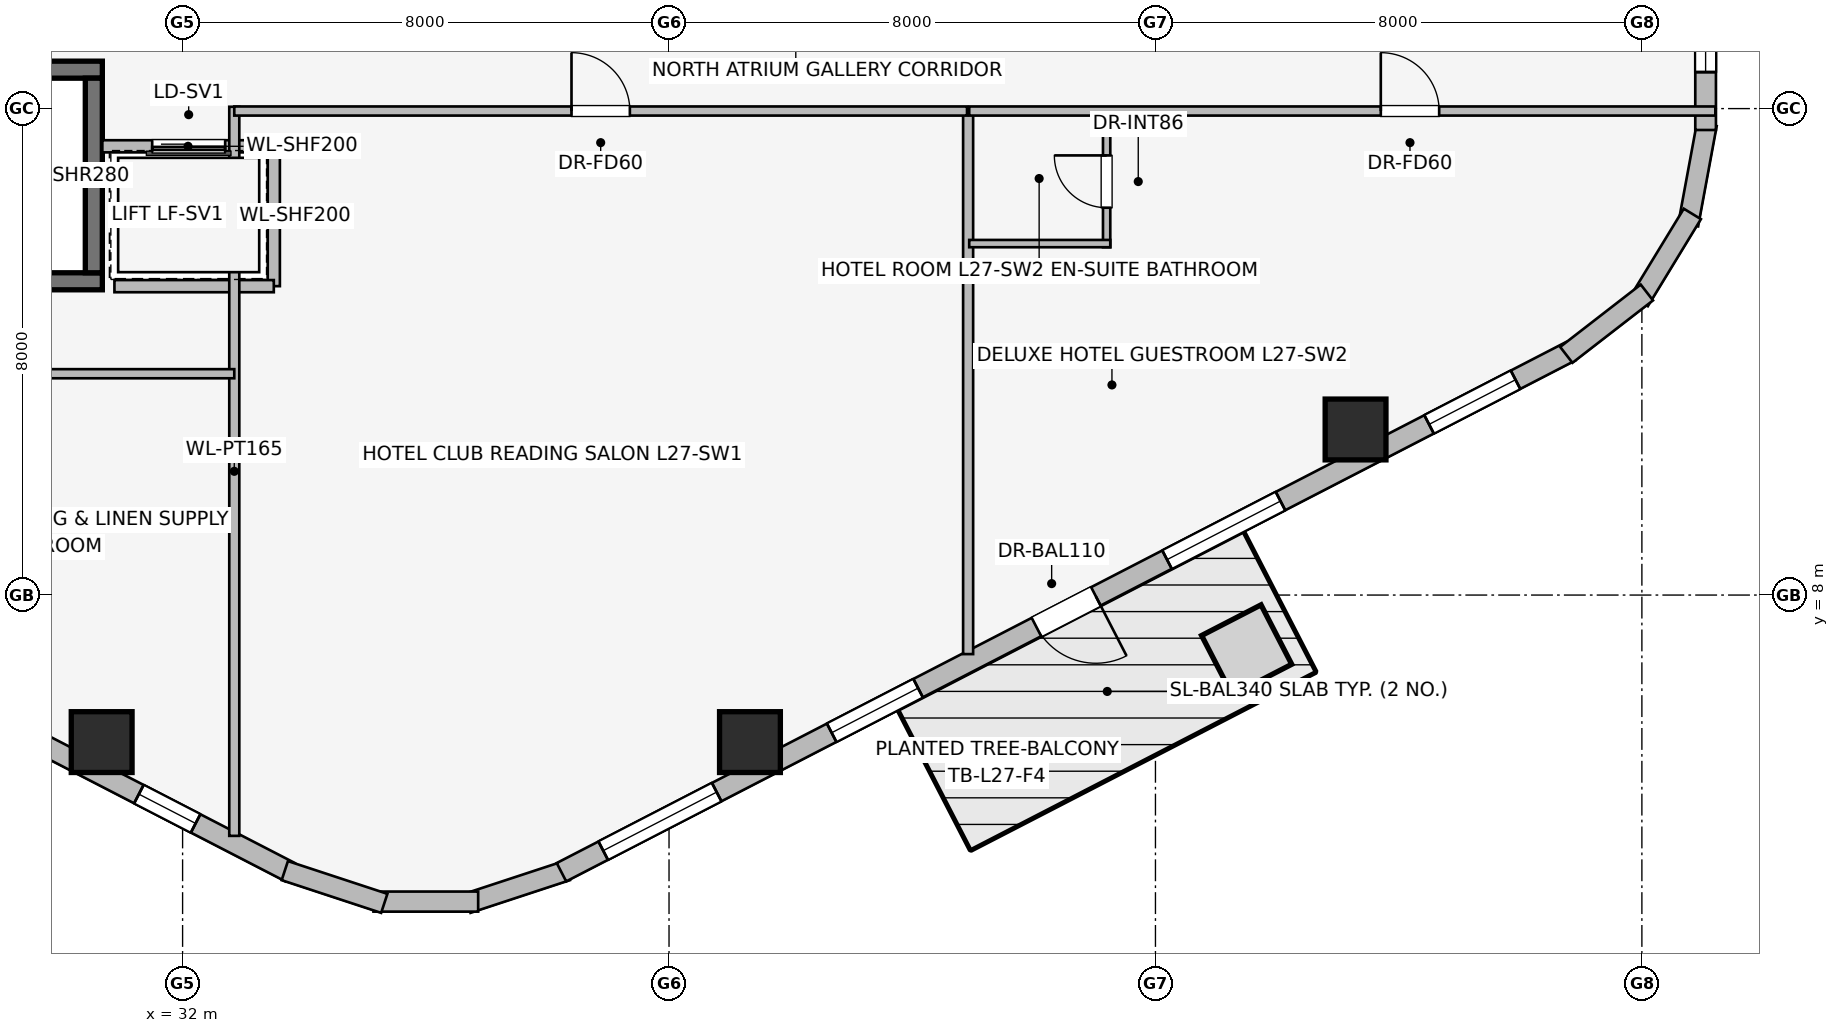
"""IFC4 building model, lengths in metres.
Left out: names, types, materials, properties, quantities, classifications, styles, units other than length and angle.
Written with IfcOpenShell. Run it as: python <this file> out.ifc"""

import sys

from ifc_helpers import new_model, si_unit, direction, frame, frame_2d, origin, origin_2d, place, context, subcontext, project, spatial, rectangle, extrude, element, fill, save


model = new_model("IFC4")
c1 = context("Model", 3, precision=1e-05, world=origin(), true_north=direction((0.0, 1.0)))
c2 = subcontext(c1, "Body", "Model", "MODEL_VIEW")
j1 = project(units=[si_unit("LENGTHUNIT", "METRE"), si_unit("PLANEANGLEUNIT", "RADIAN")], contexts=[c1])
p1 = place(None, origin())
s1 = spatial("IfcSite", under=j1, at=p1, CompositionType="ELEMENT")
p2 = place(p1, origin())
s2 = spatial("IfcBuilding", under=s1, at=p2, CompositionType="ELEMENT")
p3 = place(p2, frame((0.0, 0.0, 105.0)))
s3 = spatial("IfcBuildingStorey", under=s2, at=p3, CompositionType="ELEMENT", Elevation=105.0)
p4 = place(p3, frame((22.32, 13.16, 0.0), z_axis=(0.0, 0.0, 1.0), x_axis=(1.0, 0.0, 0.0)))
e1 = element("IfcWall", 1, at=p4, inside=s3, PredefinedType="SHEAR", context=c2, shape_type="SweptSolid", body=[
    extrude(rectangle(XDim=8.36, YDim=0.28, at=frame_2d((4.18, 0.0))), origin(), (0.0, 0.0, 1.0), 3.45),
])
p5 = place(p3, frame((30.68, 16.64, 0.0), z_axis=(0.0, 0.0, 1.0), x_axis=(-1.0, 0.0, 0.0)))
e2 = element("IfcWall", 2, at=p5, inside=s3, PredefinedType="SHEAR", context=c2, shape_type="SweptSolid", body=[
    extrude(rectangle(XDim=8.36, YDim=0.28, at=frame_2d((4.18, 0.0))), origin(), (0.0, 0.0, 1.0), 3.45),
])
p6 = place(p5, frame((6.08, 0.0, 0.0)))
e3 = element("IfcOpeningElement", 3, at=p6, cuts=e2, PredefinedType="OPENING", context=c2, shape_type="SweptSolid", body=[
    extrude(rectangle(XDim=1.05, YDim=2.0, at=frame_2d((0.525, 1.0))), frame((0.0, 0.15, 0.0), z_axis=(0.0, -1.0, 0.0), x_axis=(1.0, 0.0, 0.0)), (0.0, 0.0, 1.0), 0.3),
])
p7 = place(p3, frame((30.54, 13.3, 0.0), z_axis=(0.0, 0.0, 1.0), x_axis=(0.0, 1.0, 0.0)))
e4 = element("IfcWall", 4, at=p7, inside=s3, PredefinedType="SHEAR", context=c2, shape_type="SweptSolid", body=[
    extrude(rectangle(XDim=3.2, YDim=0.28, at=frame_2d((1.6, 0.0))), origin(), (0.0, 0.0, 1.0), 3.45),
])
for number, where, z_axis, x_axis in (
    (5, (30.669, 5.582, 0.0), (0.0, 0.0, 1.0), (1.0, 0.0, 0.0)),
    (6, (41.331, 5.582, 0.0), (0.0, 0.0, 1.0), (1.0, 0.0, 0.0)),
    (7, (51.291, 10.723, 0.0), (0.0, 0.0, 1.0), (1.0, 0.0, 0.0)),
):
    element("IfcColumn", number, at=place(p3, frame(where, z_axis=z_axis, x_axis=x_axis)), inside=s3, PredefinedType="COLUMN", context=c2, shape_type="SweptSolid", body=[
        extrude(rectangle(XDim=1.0, YDim=1.0, at=origin_2d()), origin(), (0.0, 0.0, 1.0), 3.45),
    ])
p8 = place(p3, frame((33.769, 3.442, 0.0), z_axis=(0.0, 0.0, 1.0), x_axis=(-0.888613612362, 0.458656568606, 0.0)))
e8 = element("IfcWall", 8, at=p8, inside=s3, PredefinedType="STANDARD", context=c2, shape_type="SweptSolid", body=[
    extrude(rectangle(XDim=18.681, YDim=0.34, at=frame_2d((9.34, 0.0))), origin(), (0.0, 0.0, 1.0), 3.19),
])
p9 = place(p8, frame((1.75, 0.0, 0.75)))
e9 = element("IfcOpeningElement", 9, at=p9, cuts=e8, PredefinedType="OPENING", context=c2, shape_type="SweptSolid", body=[
    extrude(rectangle(XDim=1.05, YDim=1.4, at=frame_2d((0.525, 0.7))), frame((0.0, 0.18, 0.0), z_axis=(0.0, -1.0, 0.0), x_axis=(1.0, 0.0, 0.0)), (0.0, 0.0, 1.0), 0.36),
])
p10 = place(p8, frame((4.765, 0.0, 0.75)))
e10 = element("IfcOpeningElement", 10, at=p10, cuts=e8, PredefinedType="OPENING", context=c2, shape_type="SweptSolid", body=[
    extrude(rectangle(XDim=2.1, YDim=1.5, at=frame_2d((1.05, 0.75))), frame((0.0, 0.18, 0.0), z_axis=(0.0, -1.0, 0.0), x_axis=(1.0, 0.0, 0.0)), (0.0, 0.0, 1.0), 0.36),
])
p11 = place(p8, frame((7.644, 0.0, 0.75)))
e11 = element("IfcOpeningElement", 11, at=p11, cuts=e8, PredefinedType="OPENING", context=c2, shape_type="SweptSolid", body=[
    extrude(rectangle(XDim=2.1, YDim=1.5, at=frame_2d((1.05, 0.75))), frame((0.0, 0.18, 0.0), z_axis=(0.0, -1.0, 0.0), x_axis=(1.0, 0.0, 0.0)), (0.0, 0.0, 1.0), 0.36),
])
p12 = place(p8, frame((11.774, 0.0, 0.75)))
e12 = element("IfcOpeningElement", 12, at=p12, cuts=e8, PredefinedType="OPENING", context=c2, shape_type="SweptSolid", body=[
    extrude(rectangle(XDim=1.6, YDim=1.55, at=frame_2d((0.8, 0.775))), frame((0.0, 0.18, 0.0), z_axis=(0.0, -1.0, 0.0), x_axis=(1.0, 0.0, 0.0)), (0.0, 0.0, 1.0), 0.36),
])
p13 = place(p8, frame((15.92, 0.0, 0.75)))
e13 = element("IfcOpeningElement", 13, at=p13, cuts=e8, PredefinedType="OPENING", context=c2, shape_type="SweptSolid", body=[
    extrude(rectangle(XDim=1.05, YDim=1.4, at=frame_2d((0.525, 0.7))), frame((0.0, 0.18, 0.0), z_axis=(0.0, -1.0, 0.0), x_axis=(1.0, 0.0, 0.0)), (0.0, 0.0, 1.0), 0.36),
])
for number, where, z_axis, x_axis in (
    (14, (38.319, 3.468, 0.0), (0.0, 0.0, 1.0), (-0.95, -0.312, 0.0)),
    (15, (36.861, 2.959, 0.0), (0.0, 0.0, 1.0), (-1.0, 0.0, 0.0)),
    (16, (35.317, 2.93, 0.0), (0.0, 0.0, 1.0), (-0.95, 0.312, 0.0)),
):
    element("IfcWall", number, at=place(p3, frame(where, z_axis=z_axis, x_axis=x_axis)), inside=s3, PredefinedType="STANDARD", context=c2, shape_type="SweptSolid", body=[
        extrude(rectangle(XDim=1.722, YDim=0.33, at=frame_2d((0.861, 0.0))), origin(), (0.0, 0.0, 1.0), 3.19),
    ])
p14 = place(p3, frame((54.831, 12.01, 0.0), z_axis=(0.0, 0.0, 1.0), x_axis=(-0.888613612362, -0.458656568606, 0.0)))
e17 = element("IfcWall", 17, at=p14, inside=s3, PredefinedType="STANDARD", context=c2, shape_type="SweptSolid", body=[
    extrude(rectangle(XDim=18.681, YDim=0.34, at=frame_2d((9.34, 0.0))), origin(), (0.0, 0.0, 1.0), 3.19),
])
p15 = place(p14, frame((8.79, 0.0, 0.0)))
e18 = element("IfcOpeningElement", 18, at=p15, cuts=e17, PredefinedType="OPENING", context=c2, shape_type="SweptSolid", body=[
    extrude(rectangle(XDim=1.1, YDim=2.04, at=frame_2d((0.55, 1.02))), frame((0.0, 0.18, 0.0), z_axis=(0.0, -1.0, 0.0), x_axis=(1.0, 0.0, 0.0)), (0.0, 0.0, 1.0), 0.36),
])
p16 = place(p14, frame((1.023, 0.0, 0.75)))
e19 = element("IfcOpeningElement", 19, at=p16, cuts=e17, PredefinedType="OPENING", context=c2, shape_type="SweptSolid", body=[
    extrude(rectangle(XDim=1.6, YDim=1.55, at=frame_2d((0.8, 0.775))), frame((0.0, 0.18, 0.0), z_axis=(0.0, -1.0, 0.0), x_axis=(1.0, 0.0, 0.0)), (0.0, 0.0, 1.0), 0.36),
])
p17 = place(p14, frame((5.373, 0.0, 0.75)))
e20 = element("IfcOpeningElement", 20, at=p17, cuts=e17, PredefinedType="OPENING", context=c2, shape_type="SweptSolid", body=[
    extrude(rectangle(XDim=2.1, YDim=1.5, at=frame_2d((1.05, 0.75))), frame((0.0, 0.18, 0.0), z_axis=(0.0, -1.0, 0.0), x_axis=(1.0, 0.0, 0.0)), (0.0, 0.0, 1.0), 0.36),
])
p18 = place(p14, frame((12.08, 0.0, 0.75)))
e21 = element("IfcOpeningElement", 21, at=p18, cuts=e17, PredefinedType="OPENING", context=c2, shape_type="SweptSolid", body=[
    extrude(rectangle(XDim=1.6, YDim=1.55, at=frame_2d((0.8, 0.775))), frame((0.0, 0.18, 0.0), z_axis=(0.0, -1.0, 0.0), x_axis=(1.0, 0.0, 0.0)), (0.0, 0.0, 1.0), 0.36),
])
p19 = place(p14, frame((15.808, 0.0, 0.75)))
e22 = element("IfcOpeningElement", 22, at=p19, cuts=e17, PredefinedType="OPENING", context=c2, shape_type="SweptSolid", body=[
    extrude(rectangle(XDim=2.1, YDim=1.5, at=frame_2d((1.05, 0.75))), frame((0.0, 0.18, 0.0), z_axis=(0.0, -1.0, 0.0), x_axis=(1.0, 0.0, 0.0)), (0.0, 0.0, 1.0), 0.36),
])
p20 = place(p3, frame((57.068, 15.742, 0.0), z_axis=(0.0, 0.0, 1.0), x_axis=(-0.181984991895, -0.983301308209, 0.0)))
e23 = element("IfcWall", 23, at=p20, inside=s3, PredefinedType="STANDARD", context=c2, shape_type="SweptSolid", body=[
    extrude(rectangle(XDim=1.677, YDim=0.33, at=frame_2d((0.838, 0.0))), origin(), (0.0, 0.0, 1.0), 3.19),
])
p21 = place(p3, frame((56.83, 14.268, 0.0), z_axis=(0.0, 0.0, 1.0), x_axis=(-0.520519429557, -0.853849824883, 0.0)))
e24 = element("IfcWall", 24, at=p21, inside=s3, PredefinedType="STANDARD", context=c2, shape_type="SweptSolid", body=[
    extrude(rectangle(XDim=1.677, YDim=0.33, at=frame_2d((0.839, 0.0))), origin(), (0.0, 0.0, 1.0), 3.19),
])
p22 = place(p3, frame((56.082, 12.976, 0.0), z_axis=(0.0, 0.0, 1.0), x_axis=(-0.790621329885, -0.612305408053, 0.0)))
e25 = element("IfcWall", 25, at=p22, inside=s3, PredefinedType="STANDARD", context=c2, shape_type="SweptSolid", body=[
    extrude(rectangle(XDim=1.676, YDim=0.33, at=frame_2d((0.838, 0.0))), origin(), (0.0, 0.0, 1.0), 3.19),
])
p23 = place(p3, frame((57.048, 20.325, 0.0), z_axis=(0.0, 0.0, 1.0), x_axis=(0.0, -1.0, 0.0)))
e26 = element("IfcWall", 26, at=p23, inside=s3, PredefinedType="STANDARD", context=c2, shape_type="SweptSolid", body=[
    extrude(rectangle(XDim=4.677, YDim=0.34, at=frame_2d((2.338, 0.0))), origin(), (0.0, 0.0, 1.0), 3.19),
])
p24 = place(p23, frame((2.675, 0.0, 0.75)))
e27 = element("IfcOpeningElement", 27, at=p24, cuts=e26, PredefinedType="OPENING", context=c2, shape_type="SweptSolid", body=[
    extrude(rectangle(XDim=1.05, YDim=1.4, at=frame_2d((0.525, 0.7))), frame((0.0, 0.18, 0.0), z_axis=(0.0, -1.0, 0.0), x_axis=(1.0, 0.0, 0.0)), (0.0, 0.0, 1.0), 0.36),
])
p25 = place(p3, frame((33.5, 15.38, 0.0), z_axis=(0.0, 0.0, 1.0), x_axis=(-1.0, 0.0, 0.0)))
e28 = element("IfcWall", 28, at=p25, inside=s3, PredefinedType="PARTITIONING", context=c2, shape_type="SweptSolid", body=[
    extrude(rectangle(XDim=2.82, YDim=0.2, at=frame_2d((1.41, 0.0))), origin(), (0.0, 0.0, 1.0), 3.19),
])
p26 = place(p25, frame((0.8, 0.0, 0.0)))
e29 = element("IfcOpeningElement", 29, at=p26, cuts=e28, PredefinedType="OPENING", context=c2, shape_type="SweptSolid", body=[
    extrude(rectangle(XDim=1.2, YDim=2.2, at=frame_2d((0.6, 1.1))), frame((0.0, 0.11, 0.0), z_axis=(0.0, -1.0, 0.0), x_axis=(1.0, 0.0, 0.0)), (0.0, 0.0, 1.0), 0.22),
])
p27 = place(p3, frame((33.5, 13.08, 0.0), z_axis=(0.0, 0.0, 1.0), x_axis=(0.0, 1.0, 0.0)))
e30 = element("IfcWall", 30, at=p27, inside=s3, PredefinedType="PARTITIONING", context=c2, shape_type="SweptSolid", body=[
    extrude(rectangle(XDim=2.3, YDim=0.2, at=frame_2d((1.15, 0.0))), origin(), (0.0, 0.0, 1.0), 3.19),
])
p28 = place(p3, frame((30.879, 13.08, 0.0), z_axis=(0.0, 0.0, 1.0), x_axis=(1.0, 0.0, 0.0)))
e31 = element("IfcWall", 31, at=p28, inside=s3, PredefinedType="PARTITIONING", context=c2, shape_type="SweptSolid", body=[
    extrude(rectangle(XDim=2.621, YDim=0.2, at=frame_2d((1.311, 0.0))), origin(), (0.0, 0.0, 1.0), 3.19),
])
p29 = place(p3, frame((32.85, 4.04, 0.0), z_axis=(0.0, 0.0, 1.0), x_axis=(0.0, 1.0, 0.0)))
e32 = element("IfcWall", 32, at=p29, inside=s3, PredefinedType="PARTITIONING", context=c2, shape_type="SweptSolid", body=[
    extrude(rectangle(XDim=11.99, YDim=0.165, at=frame_2d((5.995, 0.0))), origin(), (0.0, 0.0, 1.0), 3.19),
])
p30 = place(p3, frame((18.126, 11.64, 0.0), z_axis=(0.0, 0.0, 1.0), x_axis=(1.0, 0.0, 0.0)))
e33 = element("IfcWall", 33, at=p30, inside=s3, PredefinedType="PARTITIONING", context=c2, shape_type="SweptSolid", body=[
    extrude(rectangle(XDim=14.724, YDim=0.15, at=frame_2d((7.362, 0.0))), origin(), (0.0, 0.0, 1.0), 3.19),
])
p31 = place(p30, frame((4.274, 0.0, 0.0)))
e34 = element("IfcOpeningElement", 34, at=p31, cuts=e33, PredefinedType="OPENING", context=c2, shape_type="SweptSolid", body=[
    extrude(rectangle(XDim=0.9, YDim=2.0, at=frame_2d((0.45, 1.0))), frame((0.0, 0.085, 0.0), z_axis=(0.0, -1.0, 0.0), x_axis=(1.0, 0.0, 0.0)), (0.0, 0.0, 1.0), 0.17),
])
p32 = place(p30, frame((7.724, 0.0, 0.0)))
e35 = element("IfcOpeningElement", 35, at=p32, cuts=e33, PredefinedType="OPENING", context=c2, shape_type="SweptSolid", body=[
    extrude(rectangle(XDim=0.9, YDim=2.0, at=frame_2d((0.45, 1.0))), frame((0.0, 0.085, 0.0), z_axis=(0.0, -1.0, 0.0), x_axis=(1.0, 0.0, 0.0)), (0.0, 0.0, 1.0), 0.17),
])
p33 = place(p3, frame((44.919, 7.029, 0.0), z_axis=(0.0, 0.0, 1.0), x_axis=(0.0, 1.0, 0.0)))
e36 = element("IfcWall", 36, at=p33, inside=s3, PredefinedType="PARTITIONING", context=c2, shape_type="SweptSolid", body=[
    extrude(rectangle(XDim=8.901, YDim=0.165, at=frame_2d((4.45, 0.0))), origin(), (0.0, 0.0, 1.0), 3.19),
])
p34 = place(p3, frame((32.85, 15.96, 0.0), z_axis=(0.0, 0.0, 1.0), x_axis=(1.0, 0.0, 0.0)))
e37 = element("IfcWall", 37, at=p34, inside=s3, PredefinedType="PARTITIONING", context=c2, shape_type="SweptSolid", body=[
    extrude(rectangle(XDim=12.051, YDim=0.15, at=frame_2d((6.025, 0.0))), origin(), (0.0, 0.0, 1.0), 3.19),
])
p35 = place(p34, frame((5.546, 0.0, 0.0)))
e38 = element("IfcOpeningElement", 38, at=p35, cuts=e37, PredefinedType="OPENING", context=c2, shape_type="SweptSolid", body=[
    extrude(rectangle(XDim=0.96, YDim=2.0, at=frame_2d((0.48, 1.0))), frame((0.0, 0.085, 0.0), z_axis=(0.0, -1.0, 0.0), x_axis=(1.0, 0.0, 0.0)), (0.0, 0.0, 1.0), 0.17),
])
p36 = place(p3, frame((47.197, 13.72, 0.0), z_axis=(0.0, 0.0, 1.0), x_axis=(0.0, 1.0, 0.0)))
e39 = element("IfcWall", 39, at=p36, inside=s3, PredefinedType="PARTITIONING", context=c2, shape_type="SweptSolid", body=[
    extrude(rectangle(XDim=2.24, YDim=0.12, at=frame_2d((1.12, 0.0))), origin(), (0.0, 0.0, 1.0), 3.19),
])
p37 = place(p36, frame((0.65, 0.0, 0.0)))
e40 = element("IfcOpeningElement", 40, at=p37, cuts=e39, PredefinedType="OPENING", context=c2, shape_type="SweptSolid", body=[
    extrude(rectangle(XDim=0.86, YDim=2.0, at=frame_2d((0.43, 1.0))), frame((0.0, 0.07, 0.0), z_axis=(0.0, -1.0, 0.0), x_axis=(1.0, 0.0, 0.0)), (0.0, 0.0, 1.0), 0.14),
])
p38 = place(p3, frame((44.937, 13.78, 0.0), z_axis=(0.0, 0.0, 1.0), x_axis=(1.0, 0.0, 0.0)))
e41 = element("IfcWall", 41, at=p38, inside=s3, PredefinedType="PARTITIONING", context=c2, shape_type="SweptSolid", body=[
    extrude(rectangle(XDim=2.32, YDim=0.12, at=frame_2d((1.16, 0.0))), origin(), (0.0, 0.0, 1.0), 3.19),
])
p39 = place(p3, frame((44.937, 15.96, 0.0), z_axis=(0.0, 0.0, 1.0), x_axis=(1.0, 0.0, 0.0)))
e42 = element("IfcWall", 42, at=p39, inside=s3, PredefinedType="PARTITIONING", context=c2, shape_type="SweptSolid", body=[
    extrude(rectangle(XDim=12.271, YDim=0.15, at=frame_2d((6.135, 0.0))), origin(), (0.0, 0.0, 1.0), 3.19),
])
p40 = place(p39, frame((6.769, 0.0, 0.0)))
e43 = element("IfcOpeningElement", 43, at=p40, cuts=e42, PredefinedType="OPENING", context=c2, shape_type="SweptSolid", body=[
    extrude(rectangle(XDim=0.96, YDim=2.0, at=frame_2d((0.48, 1.0))), frame((0.0, 0.085, 0.0), z_axis=(0.0, -1.0, 0.0), x_axis=(1.0, 0.0, 0.0)), (0.0, 0.0, 1.0), 0.17),
])
p41 = place(p9, origin())
e44 = element("IfcWindow", 44, at=p41, inside=s3, PartitioningType="SINGLE_PANEL", PredefinedType="WINDOW", context=c2, shape_type="SweptSolid", body=[
    extrude(rectangle(XDim=1.05, YDim=1.4, at=frame_2d((0.525, 0.7))), frame((0.0, 0.03, 0.0), z_axis=(0.0, -1.0, 0.0), x_axis=(1.0, 0.0, 0.0)), (0.0, 0.0, 1.0), 0.06),
])
fill(e9, e44)
p42 = place(p15, origin())
e45 = element("IfcDoor", 45, at=p42, inside=s3, OperationType="SINGLE_SWING_LEFT", PredefinedType="DOOR", context=c2, shape_type="SweptSolid", body=[
    extrude(rectangle(XDim=1.1, YDim=2.04, at=frame_2d((0.55, 1.02))), frame((0.0, 0.025, 0.0), z_axis=(0.0, -1.0, 0.0), x_axis=(1.0, 0.0, 0.0)), (0.0, 0.0, 1.0), 0.05),
])
fill(e18, e45)
p43 = place(p16, origin())
e46 = element("IfcWindow", 46, at=p43, inside=s3, PartitioningType="SINGLE_PANEL", PredefinedType="WINDOW", context=c2, shape_type="SweptSolid", body=[
    extrude(rectangle(XDim=1.6, YDim=1.55, at=frame_2d((0.8, 0.775))), frame((0.0, 0.03, 0.0), z_axis=(0.0, -1.0, 0.0), x_axis=(1.0, 0.0, 0.0)), (0.0, 0.0, 1.0), 0.06),
])
fill(e19, e46)
p44 = place(p17, origin())
e47 = element("IfcWindow", 47, at=p44, inside=s3, PartitioningType="SINGLE_PANEL", PredefinedType="WINDOW", context=c2, shape_type="SweptSolid", body=[
    extrude(rectangle(XDim=2.1, YDim=1.5, at=frame_2d((1.05, 0.75))), frame((0.0, 0.03, 0.0), z_axis=(0.0, -1.0, 0.0), x_axis=(1.0, 0.0, 0.0)), (0.0, 0.0, 1.0), 0.06),
])
fill(e20, e47)
p45 = place(p18, origin())
e48 = element("IfcWindow", 48, at=p45, inside=s3, PartitioningType="SINGLE_PANEL", PredefinedType="WINDOW", context=c2, shape_type="SweptSolid", body=[
    extrude(rectangle(XDim=1.6, YDim=1.55, at=frame_2d((0.8, 0.775))), frame((0.0, 0.03, 0.0), z_axis=(0.0, -1.0, 0.0), x_axis=(1.0, 0.0, 0.0)), (0.0, 0.0, 1.0), 0.06),
])
fill(e21, e48)
p46 = place(p19, origin())
e49 = element("IfcWindow", 49, at=p46, inside=s3, PartitioningType="SINGLE_PANEL", PredefinedType="WINDOW", context=c2, shape_type="SweptSolid", body=[
    extrude(rectangle(XDim=2.1, YDim=1.5, at=frame_2d((1.05, 0.75))), frame((0.0, 0.03, 0.0), z_axis=(0.0, -1.0, 0.0), x_axis=(1.0, 0.0, 0.0)), (0.0, 0.0, 1.0), 0.06),
])
fill(e22, e49)
p47 = place(p24, origin())
e50 = element("IfcWindow", 50, at=p47, inside=s3, PartitioningType="SINGLE_PANEL", PredefinedType="WINDOW", context=c2, shape_type="SweptSolid", body=[
    extrude(rectangle(XDim=1.05, YDim=1.4, at=frame_2d((0.525, 0.7))), frame((0.0, 0.03, 0.0), z_axis=(0.0, -1.0, 0.0), x_axis=(1.0, 0.0, 0.0)), (0.0, 0.0, 1.0), 0.06),
])
fill(e27, e50)
p48 = place(p26, origin())
e51 = element("IfcDoor", 51, at=p48, inside=s3, OperationType="SLIDING_TO_RIGHT", PredefinedType="DOOR", context=c2, shape_type="SweptSolid", body=[
    extrude(rectangle(XDim=1.2, YDim=2.2, at=frame_2d((0.6, 1.1))), frame((0.0, 0.025, 0.0), z_axis=(0.0, -1.0, 0.0), x_axis=(1.0, 0.0, 0.0)), (0.0, 0.0, 1.0), 0.05),
])
fill(e29, e51)
p49 = place(p35, origin())
e52 = element("IfcDoor", 52, at=p49, inside=s3, OperationType="SINGLE_SWING_LEFT", PredefinedType="DOOR", context=c2, shape_type="SweptSolid", body=[
    extrude(rectangle(XDim=0.96, YDim=2.0, at=frame_2d((0.48, 1.0))), frame((0.0, 0.025, 0.0), z_axis=(0.0, -1.0, 0.0), x_axis=(1.0, 0.0, 0.0)), (0.0, 0.0, 1.0), 0.05),
])
fill(e38, e52)
p50 = place(p37, origin())
e53 = element("IfcDoor", 53, at=p50, inside=s3, OperationType="SINGLE_SWING_RIGHT", PredefinedType="DOOR", context=c2, shape_type="SweptSolid", body=[
    extrude(rectangle(XDim=0.86, YDim=2.0, at=frame_2d((0.43, 1.0))), frame((0.0, 0.025, 0.0), z_axis=(0.0, -1.0, 0.0), x_axis=(1.0, 0.0, 0.0)), (0.0, 0.0, 1.0), 0.05),
])
fill(e40, e53)
p51 = place(p40, origin())
e54 = element("IfcDoor", 54, at=p51, inside=s3, OperationType="SINGLE_SWING_LEFT", PredefinedType="DOOR", context=c2, shape_type="SweptSolid", body=[
    extrude(rectangle(XDim=0.96, YDim=2.0, at=frame_2d((0.48, 1.0))), frame((0.0, 0.025, 0.0), z_axis=(0.0, -1.0, 0.0), x_axis=(1.0, 0.0, 0.0)), (0.0, 0.0, 1.0), 0.05),
])
fill(e43, e54)
save(model, sys.argv[1])
